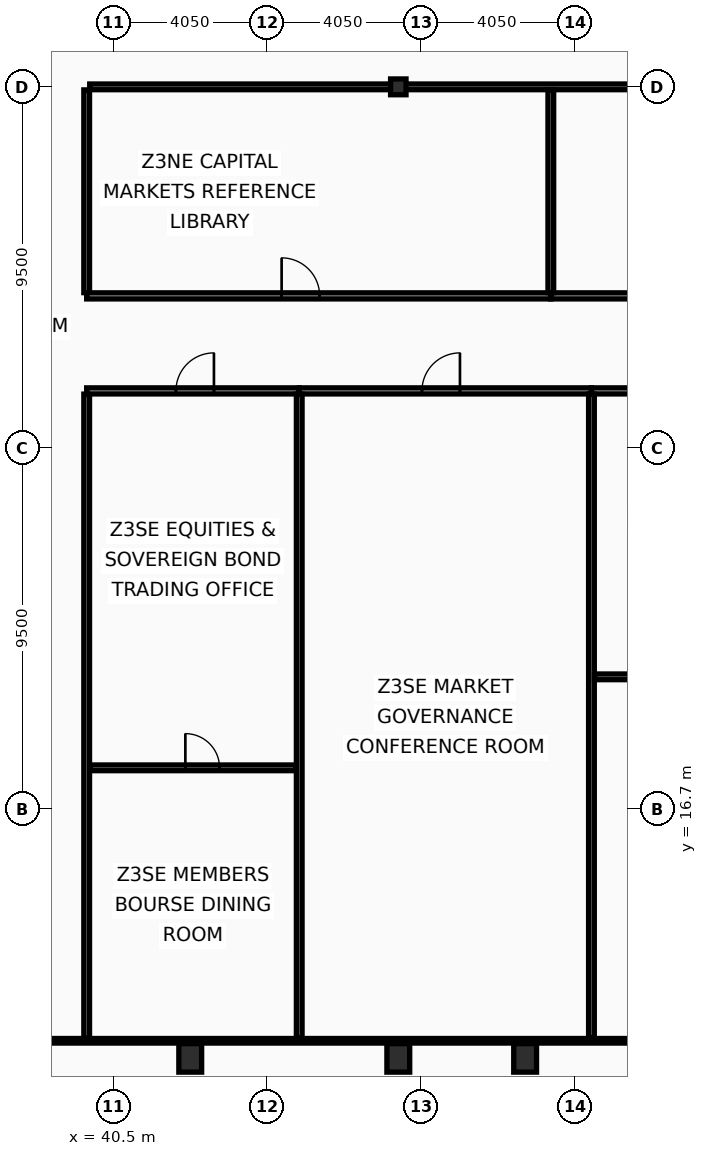
"""IFC4 building model, lengths in metres.
Left out: names, types, materials, properties, quantities, classifications, styles, units other than length and angle.
Written with IfcOpenShell. Run it as: python <this file> out.ifc"""

import sys

from ifc_helpers import new_model, si_unit, direction, frame, frame_2d, origin, origin_2d, place, context, subcontext, project, spatial, rectangle, hollow_rectangle, i_section, extrude, element, fill, save


model = new_model("IFC4")
c1 = context("Model", 3, precision=1e-05, world=origin(), true_north=direction((0.0, 1.0)))
c2 = subcontext(c1, "Body", "Model", "MODEL_VIEW")
j1 = project(units=[si_unit("LENGTHUNIT", "METRE"), si_unit("PLANEANGLEUNIT", "RADIAN")], contexts=[c1])
p1 = place(None, origin())
s1 = spatial("IfcSite", under=j1, at=p1, CompositionType="ELEMENT")
p2 = place(p1, origin())
s2 = spatial("IfcBuilding", under=s1, at=p2, CompositionType="ELEMENT")
p3 = place(p2, frame((0.0, 0.0, 246.2)))
s3 = spatial("IfcBuildingStorey", under=s2, at=p3, CompositionType="ELEMENT", Elevation=246.2)
for number, where, z_axis, x_axis in (
    (1, (42.525, 10.15, 0.0), (0.0, 0.0, 1.0), (1.0, 0.0, 0.0)),
    (2, (48.0, 10.15, 0.0), (0.0, 0.0, 1.0), (1.0, 0.0, 0.0)),
    (3, (51.337, 10.15, 0.0), (0.0, 0.0, 1.0), (1.0, 0.0, 0.0)),
):
    element("IfcColumn", number, at=place(p3, frame(where, z_axis=z_axis, x_axis=x_axis)), inside=s3, PredefinedType="COLUMN", context=c2, shape_type="SweptSolid", body=[
        extrude(hollow_rectangle(XDim=0.6, YDim=0.75, WallThickness=0.045, at=origin_2d()), origin(), (0.0, 0.0, 1.0), 3.6),
    ])
p4 = place(p3, frame((48.0, 35.7, 0.0), z_axis=(0.0, 0.0, 1.0), x_axis=(1.0, 0.0, 0.0)))
e4 = element("IfcColumn", 4, at=p4, inside=s3, PredefinedType="COLUMN", context=c2, shape_type="SweptSolid", body=[
    extrude(i_section(OverallWidth=0.406, OverallDepth=0.416, WebThickness=0.03, FlangeThickness=0.048, at=origin_2d()), origin(), (0.0, 0.0, 1.0), 3.6),
])
p5 = place(p3, frame((39.8, 10.665, 0.0), z_axis=(0.0, 0.0, 1.0), x_axis=(0.0, 1.0, 0.0)))
e5 = element("IfcWall", 5, at=p5, inside=s3, PredefinedType="PARTITIONING", context=c2, shape_type="SweptSolid", body=[
    extrude(rectangle(XDim=16.95, YDim=0.15, at=frame_2d((8.475, 0.0))), origin(), (0.0, 0.0, 1.0), 2.98),
])
p6 = place(p3, frame((39.8, 30.285, 0.0), z_axis=(0.0, 0.0, 1.0), x_axis=(0.0, 1.0, 0.0)))
e6 = element("IfcWall", 6, at=p6, inside=s3, PredefinedType="PARTITIONING", context=c2, shape_type="SweptSolid", body=[
    extrude(rectangle(XDim=5.335, YDim=0.15, at=frame_2d((2.667, 0.0))), origin(), (0.0, 0.0, 1.0), 2.98),
])
p7 = place(p3, frame((39.88, 35.7, 0.0), z_axis=(0.0, 0.0, 1.0), x_axis=(1.0, 0.0, 0.0)))
e7 = element("IfcWall", 7, at=p7, inside=s3, PredefinedType="PARTITIONING", context=c2, shape_type="SweptSolid", body=[
    extrude(rectangle(XDim=22.925, YDim=0.15, at=frame_2d((11.462, 0.0))), origin(), (0.0, 0.0, 1.0), 2.78),
])
p8 = place(p3, frame((39.8, 27.7, 0.0), z_axis=(0.0, 0.0, 1.0), x_axis=(1.0, 0.0, 0.0)))
e8 = element("IfcWall", 8, at=p8, inside=s3, PredefinedType="PARTITIONING", context=c2, shape_type="SweptSolid", body=[
    extrude(rectangle(XDim=5.593, YDim=0.16, at=frame_2d((2.796, 0.0))), origin(), (0.0, 0.0, 1.0), 2.78),
])
p9 = place(p8, frame((2.349, 0.0, 0.0)))
e9 = element("IfcOpeningElement", 9, at=p9, cuts=e8, PredefinedType="OPENING", context=c2, shape_type="SweptSolid", body=[
    extrude(rectangle(XDim=1.0, YDim=2.05, at=frame_2d((0.5, 1.025))), frame((0.0, 0.09, 0.0), z_axis=(0.0, -1.0, 0.0), x_axis=(1.0, 0.0, 0.0)), (0.0, 0.0, 1.0), 0.18),
])
p10 = place(p3, frame((39.88, 17.782, 0.0), z_axis=(0.0, 0.0, 1.0), x_axis=(1.0, 0.0, 0.0)))
e10 = element("IfcWall", 10, at=p10, inside=s3, PredefinedType="PARTITIONING", context=c2, shape_type="SweptSolid", body=[
    extrude(rectangle(XDim=5.433, YDim=0.15, at=frame_2d((2.716, 0.0))), origin(), (0.0, 0.0, 1.0), 2.78),
])
p11 = place(p10, frame((2.517, 0.0, 0.0)))
e11 = element("IfcOpeningElement", 11, at=p11, cuts=e10, PredefinedType="OPENING", context=c2, shape_type="SweptSolid", body=[
    extrude(rectangle(XDim=0.9, YDim=2.05, at=frame_2d((0.45, 1.025))), frame((0.0, 0.085, 0.0), z_axis=(0.0, -1.0, 0.0), x_axis=(1.0, 0.0, 0.0)), (0.0, 0.0, 1.0), 0.17),
])
p12 = place(p3, frame((45.393, 27.7, 0.0), z_axis=(0.0, 0.0, 1.0), x_axis=(1.0, 0.0, 0.0)))
e12 = element("IfcWall", 12, at=p12, inside=s3, PredefinedType="PARTITIONING", context=c2, shape_type="SweptSolid", body=[
    extrude(rectangle(XDim=7.69, YDim=0.16, at=frame_2d((3.845, 0.0))), origin(), (0.0, 0.0, 1.0), 2.78),
])
p13 = place(p12, frame((3.23, 0.0, 0.0)))
e13 = element("IfcOpeningElement", 13, at=p13, cuts=e12, PredefinedType="OPENING", context=c2, shape_type="SweptSolid", body=[
    extrude(rectangle(XDim=1.0, YDim=2.05, at=frame_2d((0.5, 1.025))), frame((0.0, 0.09, 0.0), z_axis=(0.0, -1.0, 0.0), x_axis=(1.0, 0.0, 0.0)), (0.0, 0.0, 1.0), 0.18),
])
p14 = place(p3, frame((45.393, 10.665, 0.0), z_axis=(0.0, 0.0, 1.0), x_axis=(0.0, 1.0, 0.0)))
e14 = element("IfcWall", 14, at=p14, inside=s3, PredefinedType="PARTITIONING", context=c2, shape_type="SweptSolid", body=[
    extrude(rectangle(XDim=16.95, YDim=0.15, at=frame_2d((8.475, 0.0))), origin(), (0.0, 0.0, 1.0), 2.98),
])
p15 = place(p3, frame((53.083, 27.7, 0.0), z_axis=(0.0, 0.0, 1.0), x_axis=(1.0, 0.0, 0.0)))
e15 = element("IfcWall", 15, at=p15, inside=s3, PredefinedType="PARTITIONING", context=c2, shape_type="SweptSolid", body=[
    extrude(rectangle(XDim=9.787, YDim=0.16, at=frame_2d((4.894, 0.0))), origin(), (0.0, 0.0, 1.0), 2.78),
])
p16 = place(p15, frame((4.111, 0.0, 0.0)))
e16 = element("IfcOpeningElement", 16, at=p16, cuts=e15, PredefinedType="OPENING", context=c2, shape_type="SweptSolid", body=[
    extrude(rectangle(XDim=1.0, YDim=2.05, at=frame_2d((0.5, 1.025))), frame((0.0, 0.09, 0.0), z_axis=(0.0, -1.0, 0.0), x_axis=(1.0, 0.0, 0.0)), (0.0, 0.0, 1.0), 0.18),
])
p17 = place(p3, frame((53.083, 10.665, 0.0), z_axis=(0.0, 0.0, 1.0), x_axis=(0.0, 1.0, 0.0)))
e17 = element("IfcWall", 17, at=p17, inside=s3, PredefinedType="PARTITIONING", context=c2, shape_type="SweptSolid", body=[
    extrude(rectangle(XDim=16.95, YDim=0.15, at=frame_2d((8.475, 0.0))), origin(), (0.0, 0.0, 1.0), 2.98),
])
p18 = place(p3, frame((53.163, 20.176, 0.0), z_axis=(0.0, 0.0, 1.0), x_axis=(1.0, 0.0, 0.0)))
e18 = element("IfcWall", 18, at=p18, inside=s3, PredefinedType="PARTITIONING", context=c2, shape_type="SweptSolid", body=[
    extrude(rectangle(XDim=9.642, YDim=0.15, at=frame_2d((4.821, 0.0))), origin(), (0.0, 0.0, 1.0), 2.78),
])
p19 = place(p18, frame((4.404, 0.0, 0.0)))
e19 = element("IfcOpeningElement", 19, at=p19, cuts=e18, PredefinedType="OPENING", context=c2, shape_type="SweptSolid", body=[
    extrude(rectangle(XDim=0.9, YDim=2.05, at=frame_2d((0.45, 1.025))), frame((0.0, 0.085, 0.0), z_axis=(0.0, -1.0, 0.0), x_axis=(1.0, 0.0, 0.0)), (0.0, 0.0, 1.0), 0.17),
])
p20 = place(p3, frame((39.8, 30.2, 0.0), z_axis=(0.0, 0.0, 1.0), x_axis=(1.0, 0.0, 0.0)))
e20 = element("IfcWall", 20, at=p20, inside=s3, PredefinedType="PARTITIONING", context=c2, shape_type="SweptSolid", body=[
    extrude(rectangle(XDim=12.213, YDim=0.16, at=frame_2d((6.107, 0.0))), origin(), (0.0, 0.0, 1.0), 2.78),
])
p21 = place(p20, frame((5.13, 0.0, 0.0)))
e21 = element("IfcOpeningElement", 21, at=p21, cuts=e20, PredefinedType="OPENING", context=c2, shape_type="SweptSolid", body=[
    extrude(rectangle(XDim=1.0, YDim=2.05, at=frame_2d((0.5, 1.025))), frame((0.0, 0.09, 0.0), z_axis=(0.0, -1.0, 0.0), x_axis=(1.0, 0.0, 0.0)), (0.0, 0.0, 1.0), 0.18),
])
p22 = place(p3, frame((52.013, 30.2, 0.0), z_axis=(0.0, 0.0, 1.0), x_axis=(1.0, 0.0, 0.0)))
e22 = element("IfcWall", 22, at=p22, inside=s3, PredefinedType="PARTITIONING", context=c2, shape_type="SweptSolid", body=[
    extrude(rectangle(XDim=10.857, YDim=0.16, at=frame_2d((5.428, 0.0))), origin(), (0.0, 0.0, 1.0), 2.78),
])
p23 = place(p22, frame((4.56, 0.0, 0.0)))
e23 = element("IfcOpeningElement", 23, at=p23, cuts=e22, PredefinedType="OPENING", context=c2, shape_type="SweptSolid", body=[
    extrude(rectangle(XDim=1.0, YDim=2.05, at=frame_2d((0.5, 1.025))), frame((0.0, 0.09, 0.0), z_axis=(0.0, -1.0, 0.0), x_axis=(1.0, 0.0, 0.0)), (0.0, 0.0, 1.0), 0.18),
])
p24 = place(p3, frame((52.013, 30.285, 0.0), z_axis=(0.0, 0.0, 1.0), x_axis=(0.0, 1.0, 0.0)))
e24 = element("IfcWall", 24, at=p24, inside=s3, PredefinedType="PARTITIONING", context=c2, shape_type="SweptSolid", body=[
    extrude(rectangle(XDim=5.335, YDim=0.15, at=frame_2d((2.667, 0.0))), origin(), (0.0, 0.0, 1.0), 2.98),
])
p25 = place(p3, frame((10.095, 10.6, 0.0), z_axis=(0.0, 0.0, 1.0), x_axis=(1.0, 0.0, 0.0)))
e25 = element("IfcWall", 25, at=p25, inside=s3, PredefinedType="PARTITIONING", context=c2, shape_type="SweptSolid", body=[
    extrude(rectangle(XDim=52.71, YDim=0.12, at=frame_2d((26.355, 0.0))), origin(), (0.0, 0.0, 1.0), 2.78),
])
p26 = place(p9, origin())
e26 = element("IfcDoor", 26, at=p26, inside=s3, OperationType="SINGLE_SWING_RIGHT", PredefinedType="DOOR", context=c2, shape_type="SweptSolid", body=[
    extrude(rectangle(XDim=1.0, YDim=2.05, at=frame_2d((0.5, 1.025))), frame((0.0, 0.025, 0.0), z_axis=(0.0, -1.0, 0.0), x_axis=(1.0, 0.0, 0.0)), (0.0, 0.0, 1.0), 0.05),
])
fill(e9, e26)
p27 = place(p11, origin())
e27 = element("IfcDoor", 27, at=p27, inside=s3, OperationType="SINGLE_SWING_LEFT", PredefinedType="DOOR", context=c2, shape_type="SweptSolid", body=[
    extrude(rectangle(XDim=0.9, YDim=2.05, at=frame_2d((0.45, 1.025))), frame((0.0, 0.025, 0.0), z_axis=(0.0, -1.0, 0.0), x_axis=(1.0, 0.0, 0.0)), (0.0, 0.0, 1.0), 0.05),
])
fill(e11, e27)
p28 = place(p13, origin())
e28 = element("IfcDoor", 28, at=p28, inside=s3, OperationType="SINGLE_SWING_RIGHT", PredefinedType="DOOR", context=c2, shape_type="SweptSolid", body=[
    extrude(rectangle(XDim=1.0, YDim=2.05, at=frame_2d((0.5, 1.025))), frame((0.0, 0.025, 0.0), z_axis=(0.0, -1.0, 0.0), x_axis=(1.0, 0.0, 0.0)), (0.0, 0.0, 1.0), 0.05),
])
fill(e13, e28)
p29 = place(p21, origin())
e29 = element("IfcDoor", 29, at=p29, inside=s3, OperationType="SINGLE_SWING_LEFT", PredefinedType="DOOR", context=c2, shape_type="SweptSolid", body=[
    extrude(rectangle(XDim=1.0, YDim=2.05, at=frame_2d((0.5, 1.025))), frame((0.0, 0.025, 0.0), z_axis=(0.0, -1.0, 0.0), x_axis=(1.0, 0.0, 0.0)), (0.0, 0.0, 1.0), 0.05),
])
fill(e21, e29)
save(model, sys.argv[1])
